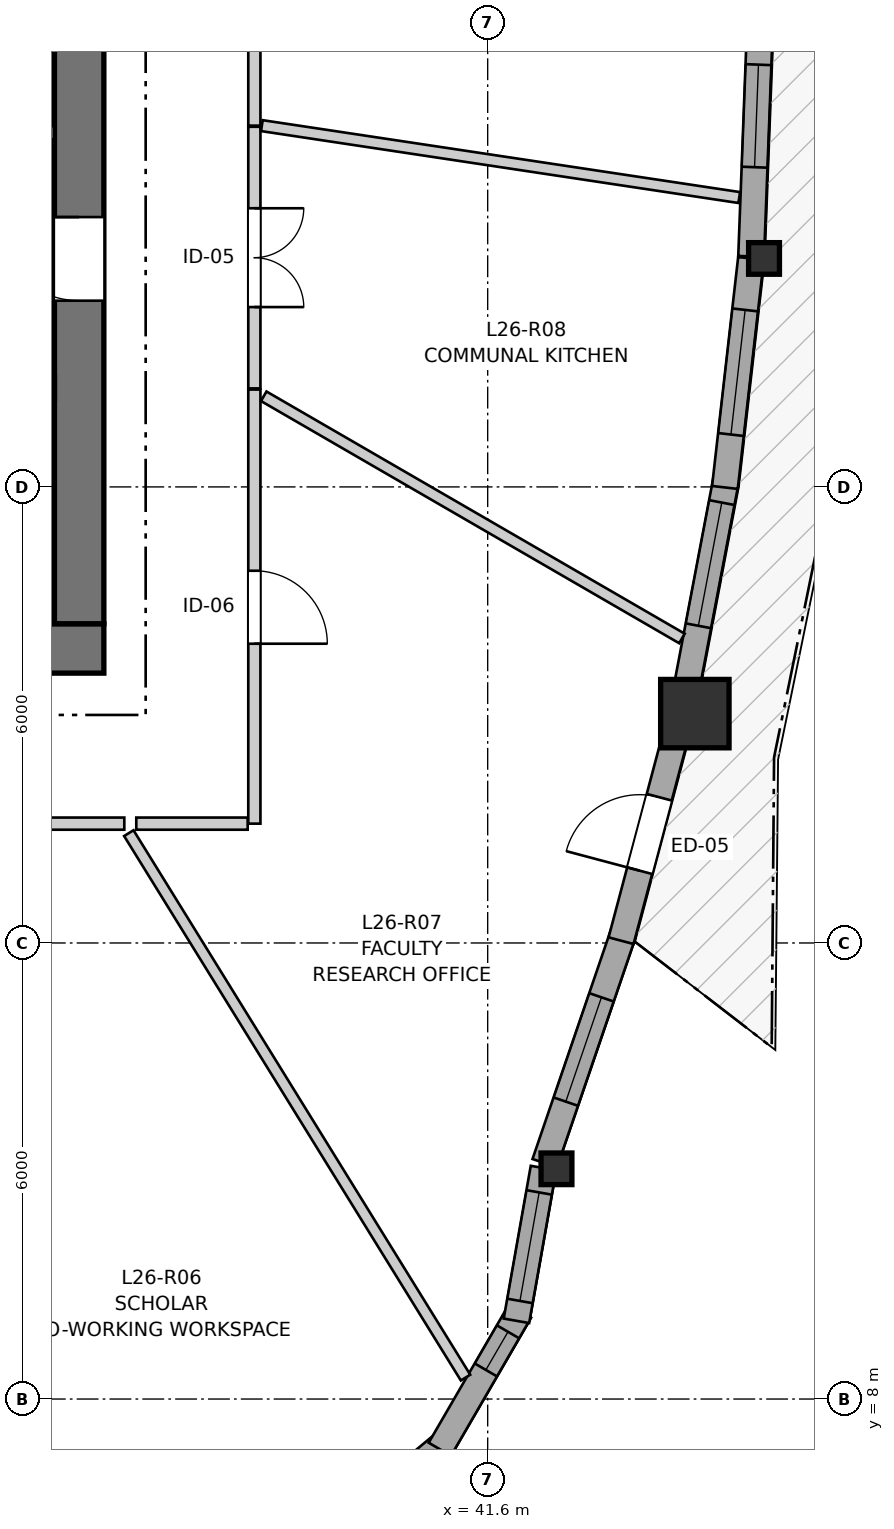
"""IFC4 building model, lengths in metres.
Left out: names, types, materials, properties, quantities, classifications, styles, units other than length and angle.
Written with IfcOpenShell. Run it as: python <this file> out.ifc"""

import sys

from ifc_helpers import new_model, si_unit, direction, frame, frame_2d, origin, origin_2d, place, context, subcontext, project, spatial, rectangle, i_section, extrude, source, transform, mapped, element, fill, save


model = new_model("IFC4")
c1 = context("Model", 3, precision=1e-05, world=origin(), true_north=direction((0.0, 1.0)))
c2 = subcontext(c1, "Body", "Model", "MODEL_VIEW")
j1 = project(units=[si_unit("LENGTHUNIT", "METRE"), si_unit("PLANEANGLEUNIT", "RADIAN")], contexts=[c1])
p1 = place(None, origin())
s1 = spatial("IfcSite", under=j1, at=p1, CompositionType="ELEMENT")
p2 = place(p1, origin())
s2 = spatial("IfcBuilding", under=s1, at=p2, CompositionType="ELEMENT")
p3 = place(p2, frame((0.0, 0.0, 89.6)))
s3 = spatial("IfcBuildingStorey", under=s2, at=p3, CompositionType="ELEMENT", Elevation=89.6)
p4 = place(p3, frame((24.15, 17.875, 0.0), z_axis=(0.0, 0.0, 1.0), x_axis=(1.0, 0.0, 0.0)))
e1 = element("IfcWall", 1, at=p4, inside=s3, PredefinedType="SHEAR", context=c2, shape_type="SweptSolid", body=[
    extrude(rectangle(XDim=12.4, YDim=0.65, at=frame_2d((6.2, 0.0))), origin(), (0.0, 0.0, 1.0), 2.95),
])
p5 = place(p3, frame((36.225, 18.2, 0.0), z_axis=(0.0, 0.0, 1.0), x_axis=(0.0, 1.0, 0.0)))
e2 = element("IfcWall", 2, at=p5, inside=s3, PredefinedType="SHEAR", context=c2, shape_type="SweptSolid", body=[
    extrude(rectangle(XDim=15.6, YDim=0.65, at=frame_2d((7.8, 0.0))), origin(), (0.0, 0.0, 1.0), 2.95),
])
p6 = place(p5, frame((4.25, 0.0, 0.0)))
e3 = element("IfcOpeningElement", 3, at=p6, cuts=e2, PredefinedType="OPENING", context=c2, shape_type="SweptSolid", body=[
    extrude(rectangle(XDim=1.1, YDim=2.15, at=frame_2d((0.55, 1.075))), frame((0.0, 0.335, 0.0), z_axis=(0.0, -1.0, 0.0), x_axis=(1.0, 0.0, 0.0)), (0.0, 0.0, 1.0), 0.67),
])
p7 = place(p5, frame((10.25, 0.0, 0.0)))
e4 = element("IfcOpeningElement", 4, at=p7, cuts=e2, PredefinedType="OPENING", context=c2, shape_type="SweptSolid", body=[
    extrude(rectangle(XDim=1.1, YDim=2.15, at=frame_2d((0.55, 1.075))), frame((0.0, 0.335, 0.0), z_axis=(0.0, -1.0, 0.0), x_axis=(1.0, 0.0, 0.0)), (0.0, 0.0, 1.0), 0.67),
])
p8 = place(p3, frame((24.8, 21.3, 0.0), z_axis=(0.0, 0.0, 1.0), x_axis=(1.0, 0.0, 0.0)))
e5 = element("IfcWall", 5, at=p8, inside=s3, PredefinedType="SHEAR", context=c2, shape_type="SweptSolid", body=[
    extrude(rectangle(XDim=11.1, YDim=0.3, at=frame_2d((5.55, 0.0))), origin(), (0.0, 0.0, 1.0), 2.95),
])
p9 = place(p8, frame((6.22, 0.0, 0.0)))
e6 = element("IfcOpeningElement", 6, at=p9, cuts=e5, PredefinedType="OPENING", context=c2, shape_type="SweptSolid", body=[
    extrude(rectangle(XDim=0.98, YDim=2.15, at=frame_2d((0.49, 1.075))), frame((0.0, 0.16, 0.0), z_axis=(0.0, -1.0, 0.0), x_axis=(1.0, 0.0, 0.0)), (0.0, 0.0, 1.0), 0.32),
])
p10 = place(p8, frame((9.15, 0.0, 0.0)))
e7 = element("IfcOpeningElement", 7, at=p10, cuts=e5, PredefinedType="OPENING", context=c2, shape_type="SweptSolid", body=[
    extrude(rectangle(XDim=1.15, YDim=2.15, at=frame_2d((0.575, 1.075))), frame((0.0, 0.16, 0.0), z_axis=(0.0, -1.0, 0.0), x_axis=(1.0, 0.0, 0.0)), (0.0, 0.0, 1.0), 0.32),
])
m1 = source(origin(), c2, "Body", "SweptSolid", [
    extrude(i_section(OverallWidth=0.406, OverallDepth=0.416, WebThickness=0.027, FlangeThickness=0.044, FilletRadius=0.015, at=origin_2d()), origin(), (0.0, 0.0, 1.0), 2.95),
])
p11 = place(p3, frame((42.505, 11.029, 0.0), z_axis=(0.0, 0.0, 1.0), x_axis=(1.0, 0.0, 0.0)))
e8 = element("IfcColumn", 8, at=p11, inside=s3, PredefinedType="PILASTER", context=c2, shape_type="MappedRepresentation", body=[
    mapped(m1, transform((0.0, 0.0, 0.0), x_axis=(1.0, 0.0, 0.0), y_axis=(0.0, 1.0, 0.0), z_axis=(0.0, 0.0, 1.0), scale=1.0)),
])
m2 = source(origin(), c2, "Body", "SweptSolid", [
    extrude(rectangle(XDim=0.9, YDim=0.9, at=origin_2d()), origin(), (0.0, 0.0, 1.0), 2.95),
])
p12 = place(p3, frame((44.325, 17.017, 0.0), z_axis=(0.0, 0.0, 1.0), x_axis=(1.0, 0.0, 0.0)))
e9 = element("IfcColumn", 9, at=p12, inside=s3, PredefinedType="COLUMN", context=c2, shape_type="MappedRepresentation", body=[
    mapped(m2, transform((0.0, 0.0, 0.0), x_axis=(1.0, 0.0, 0.0), y_axis=(0.0, 1.0, 0.0), z_axis=(0.0, 0.0, 1.0), scale=1.0)),
])
p13 = place(p3, frame((45.236, 23.006, 0.0), z_axis=(0.0, 0.0, 1.0), x_axis=(1.0, 0.0, 0.0)))
e10 = element("IfcColumn", 10, at=p13, inside=s3, PredefinedType="PILASTER", context=c2, shape_type="MappedRepresentation", body=[
    mapped(m1, transform((0.0, 0.0, 0.0), x_axis=(1.0, 0.0, 0.0), y_axis=(0.0, 1.0, 0.0), z_axis=(0.0, 0.0, 1.0), scale=1.0)),
])
p14 = place(p3, frame((39.444, 6.099, 0.0), z_axis=(0.0, 0.0, 1.0), x_axis=(0.768497696041, 0.639852554249, 0.0)))
e11 = element("IfcWall", 11, at=p14, inside=s3, PredefinedType="SOLIDWALL", context=c2, shape_type="SweptSolid", body=[
    extrude(rectangle(XDim=2.099, YDim=0.34, at=frame_2d((1.049, 0.0))), origin(), (0.0, 0.0, 1.0), 2.48),
])
p15 = place(p14, frame((0.574, 0.0, 0.82)))
e12 = element("IfcOpeningElement", 12, at=p15, cuts=e11, PredefinedType="OPENING", context=c2, shape_type="SweptSolid", body=[
    extrude(rectangle(XDim=0.95, YDim=1.35, at=frame_2d((0.475, 0.675))), frame((0.0, 0.18, 0.0), z_axis=(0.0, -1.0, 0.0), x_axis=(1.0, 0.0, 0.0)), (0.0, 0.0, 1.0), 0.36),
])
p16 = place(p3, frame((40.971, 7.34, 0.0), z_axis=(0.0, 0.0, 1.0), x_axis=(0.501902596059, 0.864924149315, 0.0)))
e13 = element("IfcWall", 13, at=p16, inside=s3, PredefinedType="SOLIDWALL", context=c2, shape_type="SweptSolid", body=[
    extrude(rectangle(XDim=2.099, YDim=0.34, at=frame_2d((1.049, 0.0))), origin(), (0.0, 0.0, 1.0), 2.48),
])
p17 = place(p16, frame((1.206, 0.0, 0.82)))
e14 = element("IfcOpeningElement", 14, at=p17, cuts=e13, PredefinedType="OPENING", context=c2, shape_type="SweptSolid", body=[
    extrude(rectangle(XDim=0.58, YDim=1.35, at=frame_2d((0.29, 0.675))), frame((0.0, 0.18, 0.0), z_axis=(0.0, -1.0, 0.0), x_axis=(1.0, 0.0, 0.0)), (0.0, 0.0, 1.0), 0.36),
])
p18 = place(p3, frame((41.978, 9.029, 0.0), z_axis=(0.0, 0.0, 1.0), x_axis=(0.174283452483, 0.984695525627, 0.0)))
e15 = element("IfcWall", 15, at=p18, inside=s3, PredefinedType="SOLIDWALL", context=c2, shape_type="SweptSolid", body=[
    extrude(rectangle(XDim=2.041, YDim=0.34, at=frame_2d((1.021, 0.0))), origin(), (0.0, 0.0, 1.0), 2.48),
])
p19 = place(p18, frame((0.265, 0.0, 0.82)))
e16 = element("IfcOpeningElement", 16, at=p19, cuts=e15, PredefinedType="OPENING", context=c2, shape_type="SweptSolid", body=[
    extrude(rectangle(XDim=1.45, YDim=1.25, at=frame_2d((0.725, 0.625))), frame((0.0, 0.18, 0.0), z_axis=(0.0, -1.0, 0.0), x_axis=(1.0, 0.0, 0.0)), (0.0, 0.0, 1.0), 0.36),
])
p20 = place(p3, frame((42.351, 11.103, 0.0), z_axis=(0.0, 0.0, 1.0), x_axis=(0.323582854182, 0.946199839611, 0.0)))
e17 = element("IfcWall", 17, at=p20, inside=s3, PredefinedType="SOLIDWALL", context=c2, shape_type="SweptSolid", body=[
    extrude(rectangle(XDim=3.182, YDim=0.34, at=frame_2d((1.591, 0.0))), origin(), (0.0, 0.0, 1.0), 2.48),
])
p21 = place(p20, frame((0.856, 0.0, 0.82)))
e18 = element("IfcOpeningElement", 18, at=p21, cuts=e17, PredefinedType="OPENING", context=c2, shape_type="SweptSolid", body=[
    extrude(rectangle(XDim=1.45, YDim=1.25, at=frame_2d((0.725, 0.625))), frame((0.0, 0.18, 0.0), z_axis=(0.0, -1.0, 0.0), x_axis=(1.0, 0.0, 0.0)), (0.0, 0.0, 1.0), 0.36),
])
p22 = place(p3, frame((43.355, 14.03, 0.0), z_axis=(0.0, 0.0, 1.0), x_axis=(0.257056088809, 0.96639648551, 0.0)))
e19 = element("IfcWall", 19, at=p22, inside=s3, PredefinedType="SOLIDWALL", context=c2, shape_type="SweptSolid", body=[
    extrude(rectangle(XDim=2.906, YDim=0.34, at=frame_2d((1.453, 0.0))), origin(), (0.0, 0.0, 1.0), 2.48),
])
p23 = place(p22, frame((0.953, 0.0, 0.0)))
e20 = element("IfcOpeningElement", 20, at=p23, cuts=e19, PredefinedType="OPENING", context=c2, shape_type="SweptSolid", body=[
    extrude(rectangle(XDim=1.0, YDim=2.1, at=frame_2d((0.5, 1.05))), frame((0.0, 0.18, 0.0), z_axis=(0.0, -1.0, 0.0), x_axis=(1.0, 0.0, 0.0)), (0.0, 0.0, 1.0), 0.36),
])
p24 = place(p3, frame((44.201, 17.275, 0.0), z_axis=(0.0, 0.0, 1.0), x_axis=(0.186703550023, 0.982416298933, 0.0)))
e21 = element("IfcWall", 21, at=p24, inside=s3, PredefinedType="SOLIDWALL", context=c2, shape_type="SweptSolid", body=[
    extrude(rectangle(XDim=2.856, YDim=0.34, at=frame_2d((1.428, 0.0))), origin(), (0.0, 0.0, 1.0), 2.48),
])
p25 = place(p24, frame((0.914, 0.0, 0.82)))
e22 = element("IfcOpeningElement", 22, at=p25, cuts=e21, PredefinedType="OPENING", context=c2, shape_type="SweptSolid", body=[
    extrude(rectangle(XDim=1.65, YDim=1.45, at=frame_2d((0.825, 0.725))), frame((0.0, 0.18, 0.0), z_axis=(0.0, -1.0, 0.0), x_axis=(1.0, 0.0, 0.0)), (0.0, 0.0, 1.0), 0.36),
])
p26 = place(p3, frame((44.721, 19.993, 0.0), z_axis=(0.0, 0.0, 1.0), x_axis=(0.113224078967, 0.993569478165, 0.0)))
e23 = element("IfcWall", 23, at=p26, inside=s3, PredefinedType="SOLIDWALL", context=c2, shape_type="SweptSolid", body=[
    extrude(rectangle(XDim=3.032, YDim=0.34, at=frame_2d((1.516, 0.0))), origin(), (0.0, 0.0, 1.0), 2.48),
])
p27 = place(p26, frame((0.701, 0.0, 0.82)))
e24 = element("IfcOpeningElement", 24, at=p27, cuts=e23, PredefinedType="OPENING", context=c2, shape_type="SweptSolid", body=[
    extrude(rectangle(XDim=1.65, YDim=1.45, at=frame_2d((0.825, 0.725))), frame((0.0, 0.18, 0.0), z_axis=(0.0, -1.0, 0.0), x_axis=(1.0, 0.0, 0.0)), (0.0, 0.0, 1.0), 0.36),
])
p28 = place(p3, frame((45.067, 23.032, 0.0), z_axis=(0.0, 0.0, 1.0), x_axis=(0.037985210196, 0.999278301479, 0.0)))
e25 = element("IfcWall", 25, at=p28, inside=s3, PredefinedType="SOLIDWALL", context=c2, shape_type="SweptSolid", body=[
    extrude(rectangle(XDim=3.014, YDim=0.34, at=frame_2d((1.507, 0.0))), origin(), (0.0, 0.0, 1.0), 2.48),
])
p29 = place(p28, frame((1.175, 0.0, 0.82)))
e26 = element("IfcOpeningElement", 26, at=p29, cuts=e25, PredefinedType="OPENING", context=c2, shape_type="SweptSolid", body=[
    extrude(rectangle(XDim=1.35, YDim=1.45, at=frame_2d((0.675, 0.725))), frame((0.0, 0.18, 0.0), z_axis=(0.0, -1.0, 0.0), x_axis=(1.0, 0.0, 0.0)), (0.0, 0.0, 1.0), 0.36),
])
p30 = place(p3, frame((30.67, 24.66, 0.0), z_axis=(0.0, 0.0, 1.0), x_axis=(1.0, 0.0, 0.0)))
e27 = element("IfcWall", 27, at=p30, inside=s3, PredefinedType="PARTITIONING", context=c2, shape_type="SweptSolid", body=[
    extrude(rectangle(XDim=5.22, YDim=0.18, at=frame_2d((2.61, 0.0))), origin(), (0.0, 0.0, 1.0), 2.95),
])
p31 = place(p30, frame((0.68, 0.0, 0.0)))
e28 = element("IfcOpeningElement", 28, at=p31, cuts=e27, PredefinedType="OPENING", context=c2, shape_type="SweptSolid", body=[
    extrude(rectangle(XDim=0.98, YDim=2.15, at=frame_2d((0.49, 1.075))), frame((0.0, 0.1, 0.0), z_axis=(0.0, -1.0, 0.0), x_axis=(1.0, 0.0, 0.0)), (0.0, 0.0, 1.0), 0.2),
])
p32 = place(p3, frame((38.53, 21.281, 0.0), z_axis=(0.0, 0.0, 1.0), x_axis=(0.0, -1.0, 0.0)))
e29 = element("IfcWall", 29, at=p32, inside=s3, PredefinedType="PARTITIONING", context=c2, shape_type="SweptSolid", body=[
    extrude(rectangle(XDim=5.711, YDim=0.16, at=frame_2d((2.855, 0.0))), origin(), (0.0, 0.0, 1.0), 2.95),
])
p33 = place(p32, frame((2.384, 0.0, 0.0)))
e30 = element("IfcOpeningElement", 30, at=p33, cuts=e29, PredefinedType="OPENING", context=c2, shape_type="SweptSolid", body=[
    extrude(rectangle(XDim=0.96, YDim=2.1, at=frame_2d((0.48, 1.05))), frame((0.0, 0.09, 0.0), z_axis=(0.0, -1.0, 0.0), x_axis=(1.0, 0.0, 0.0)), (0.0, 0.0, 1.0), 0.18),
])
p34 = place(p3, frame((38.53, 29.22, 0.0), z_axis=(0.0, 0.0, 1.0), x_axis=(0.0, -1.0, 0.0)))
e31 = element("IfcWall", 31, at=p34, inside=s3, PredefinedType="PARTITIONING", context=c2, shape_type="SweptSolid", body=[
    extrude(rectangle(XDim=4.467, YDim=0.16, at=frame_2d((2.233, 0.0))), origin(), (0.0, 0.0, 1.0), 2.95),
])
p35 = place(p34, frame((1.584, 0.0, 0.0)))
e32 = element("IfcOpeningElement", 32, at=p35, cuts=e31, PredefinedType="OPENING", context=c2, shape_type="SweptSolid", body=[
    extrude(rectangle(XDim=1.3, YDim=2.1, at=frame_2d((0.65, 1.05))), frame((0.0, 0.09, 0.0), z_axis=(0.0, -1.0, 0.0), x_axis=(1.0, 0.0, 0.0)), (0.0, 0.0, 1.0), 0.18),
])
p36 = place(p3, frame((36.819, 15.57, 0.0), z_axis=(0.0, 0.0, 1.0), x_axis=(-1.0, 0.0, 0.0)))
e33 = element("IfcWall", 33, at=p36, inside=s3, PredefinedType="PARTITIONING", context=c2, shape_type="SweptSolid", body=[
    extrude(rectangle(XDim=3.956, YDim=0.16, at=frame_2d((1.978, 0.0))), origin(), (0.0, 0.0, 1.0), 2.95),
])
p37 = place(p36, frame((1.522, 0.0, 0.0)))
e34 = element("IfcOpeningElement", 34, at=p37, cuts=e33, PredefinedType="OPENING", context=c2, shape_type="SweptSolid", body=[
    extrude(rectangle(XDim=0.96, YDim=2.1, at=frame_2d((0.48, 1.05))), frame((0.0, 0.09, 0.0), z_axis=(0.0, -1.0, 0.0), x_axis=(1.0, 0.0, 0.0)), (0.0, 0.0, 1.0), 0.18),
])
p38 = place(p3, frame((38.53, 24.738, 0.0), z_axis=(0.0, 0.0, 1.0), x_axis=(0.0, -1.0, 0.0)))
e35 = element("IfcWall", 35, at=p38, inside=s3, PredefinedType="PARTITIONING", context=c2, shape_type="SweptSolid", body=[
    extrude(rectangle(XDim=3.442, YDim=0.16, at=frame_2d((1.721, 0.0))), origin(), (0.0, 0.0, 1.0), 2.95),
])
p39 = place(p38, frame((1.072, 0.0, 0.0)))
e36 = element("IfcOpeningElement", 36, at=p39, cuts=e35, PredefinedType="OPENING", context=c2, shape_type="SweptSolid", body=[
    extrude(rectangle(XDim=1.3, YDim=2.1, at=frame_2d((0.65, 1.05))), frame((0.0, 0.09, 0.0), z_axis=(0.0, -1.0, 0.0), x_axis=(1.0, 0.0, 0.0)), (0.0, 0.0, 1.0), 0.18),
])
p40 = place(p3, frame((36.878, 15.445, 0.0), z_axis=(0.0, 0.0, 1.0), x_axis=(0.526001305793, -0.850483760165, 0.0)))
e37 = element("IfcWall", 37, at=p40, inside=s3, PredefinedType="PARTITIONING", context=c2, shape_type="SweptSolid", body=[
    extrude(rectangle(XDim=8.422, YDim=0.145, at=frame_2d((4.211, 0.0))), origin(), (0.0, 0.0, 1.0), 2.95),
])
p41 = place(p3, frame((38.653, 21.193, 0.0), z_axis=(0.0, 0.0, 1.0), x_axis=(0.865364941279, -0.501142213753, 0.0)))
e38 = element("IfcWall", 38, at=p41, inside=s3, PredefinedType="PARTITIONING", context=c2, shape_type="SweptSolid", body=[
    extrude(rectangle(XDim=6.359, YDim=0.145, at=frame_2d((3.179, 0.0))), origin(), (0.0, 0.0, 1.0), 2.95),
])
p42 = place(p3, frame((38.629, 24.753, 0.0), z_axis=(0.0, 0.0, 1.0), x_axis=(0.988841427723, -0.148971912852, 0.0)))
e39 = element("IfcWall", 39, at=p42, inside=s3, PredefinedType="PARTITIONING", context=c2, shape_type="SweptSolid", body=[
    extrude(rectangle(XDim=6.352, YDim=0.145, at=frame_2d((3.176, 0.0))), origin(), (0.0, 0.0, 1.0), 2.95),
])
p43 = place(p3, frame((36.977, 15.57, 0.0), z_axis=(0.0, 0.0, 1.0), x_axis=(1.0, 0.0, 0.0)))
e40 = element("IfcWall", 40, at=p43, inside=s3, PredefinedType="PARTITIONING", context=c2, shape_type="SweptSolid", body=[
    extrude(rectangle(XDim=1.465, YDim=0.16, at=frame_2d((0.732, 0.0))), origin(), (0.0, 0.0, 1.0), 2.95),
])
m3 = source(origin(), c2, "Body", "SweptSolid", [
    extrude(rectangle(XDim=0.58, YDim=1.35, at=frame_2d((0.29, 0.675))), frame((0.0, 0.03, 0.0), z_axis=(0.0, -1.0, 0.0), x_axis=(1.0, 0.0, 0.0)), (0.0, 0.0, 1.0), 0.06),
])
p44 = place(p17, origin())
e41 = element("IfcWindow", 41, at=p44, inside=s3, PartitioningType="SINGLE_PANEL", PredefinedType="WINDOW", context=c2, shape_type="MappedRepresentation", body=[
    mapped(m3, transform((0.0, 0.0, 0.0), x_axis=(1.0, 0.0, 0.0), y_axis=(0.0, 1.0, 0.0), z_axis=(0.0, 0.0, 1.0), scale=1.0)),
])
fill(e14, e41)
m4 = source(origin(), c2, "Body", "SweptSolid", [
    extrude(rectangle(XDim=1.45, YDim=1.25, at=frame_2d((0.725, 0.625))), frame((0.0, 0.03, 0.0), z_axis=(0.0, -1.0, 0.0), x_axis=(1.0, 0.0, 0.0)), (0.0, 0.0, 1.0), 0.06),
])
p45 = place(p19, origin())
e42 = element("IfcWindow", 42, at=p45, inside=s3, PartitioningType="SINGLE_PANEL", PredefinedType="WINDOW", context=c2, shape_type="MappedRepresentation", body=[
    mapped(m4, transform((0.0, 0.0, 0.0), x_axis=(1.0, 0.0, 0.0), y_axis=(0.0, 1.0, 0.0), z_axis=(0.0, 0.0, 1.0), scale=1.0)),
])
fill(e16, e42)
p46 = place(p21, origin())
e43 = element("IfcWindow", 43, at=p46, inside=s3, PartitioningType="SINGLE_PANEL", PredefinedType="WINDOW", context=c2, shape_type="MappedRepresentation", body=[
    mapped(m4, transform((0.0, 0.0, 0.0), x_axis=(1.0, 0.0, 0.0), y_axis=(0.0, 1.0, 0.0), z_axis=(0.0, 0.0, 1.0), scale=1.0)),
])
fill(e18, e43)
m5 = source(origin(), c2, "Body", "SweptSolid", [
    extrude(rectangle(XDim=1.65, YDim=1.45, at=frame_2d((0.825, 0.725))), frame((0.0, 0.03, 0.0), z_axis=(0.0, -1.0, 0.0), x_axis=(1.0, 0.0, 0.0)), (0.0, 0.0, 1.0), 0.06),
])
p47 = place(p25, origin())
e44 = element("IfcWindow", 44, at=p47, inside=s3, PartitioningType="SINGLE_PANEL", PredefinedType="WINDOW", context=c2, shape_type="MappedRepresentation", body=[
    mapped(m5, transform((0.0, 0.0, 0.0), x_axis=(1.0, 0.0, 0.0), y_axis=(0.0, 1.0, 0.0), z_axis=(0.0, 0.0, 1.0), scale=1.0)),
])
fill(e22, e44)
p48 = place(p27, origin())
e45 = element("IfcWindow", 45, at=p48, inside=s3, PartitioningType="SINGLE_PANEL", PredefinedType="WINDOW", context=c2, shape_type="MappedRepresentation", body=[
    mapped(m5, transform((0.0, 0.0, 0.0), x_axis=(1.0, 0.0, 0.0), y_axis=(0.0, 1.0, 0.0), z_axis=(0.0, 0.0, 1.0), scale=1.0)),
])
fill(e24, e45)
m6 = source(origin(), c2, "Body", "SweptSolid", [
    extrude(rectangle(XDim=1.35, YDim=1.45, at=frame_2d((0.675, 0.725))), frame((0.0, 0.03, 0.0), z_axis=(0.0, -1.0, 0.0), x_axis=(1.0, 0.0, 0.0)), (0.0, 0.0, 1.0), 0.06),
])
p49 = place(p29, origin())
e46 = element("IfcWindow", 46, at=p49, inside=s3, PartitioningType="SINGLE_PANEL", PredefinedType="WINDOW", context=c2, shape_type="MappedRepresentation", body=[
    mapped(m6, transform((0.0, 0.0, 0.0), x_axis=(1.0, 0.0, 0.0), y_axis=(0.0, 1.0, 0.0), z_axis=(0.0, 0.0, 1.0), scale=1.0)),
])
fill(e26, e46)
m7 = source(origin(), c2, "Body", "SweptSolid", [
    extrude(rectangle(XDim=1.0, YDim=2.1, at=frame_2d((0.5, 1.05))), frame((0.0, 0.025, 0.0), z_axis=(0.0, -1.0, 0.0), x_axis=(1.0, 0.0, 0.0)), (0.0, 0.0, 1.0), 0.05),
])
p50 = place(p23, origin())
e47 = element("IfcDoor", 47, at=p50, inside=s3, OperationType="SINGLE_SWING_LEFT", PredefinedType="DOOR", context=c2, shape_type="MappedRepresentation", body=[
    mapped(m7, transform((0.0, 0.0, 0.0), x_axis=(1.0, 0.0, 0.0), y_axis=(0.0, 1.0, 0.0), z_axis=(0.0, 0.0, 1.0), scale=1.0)),
])
fill(e20, e47)
m8 = source(origin(), c2, "Body", "SweptSolid", [
    extrude(rectangle(XDim=1.1, YDim=2.15, at=frame_2d((0.55, 1.075))), frame((0.0, 0.025, 0.0), z_axis=(0.0, -1.0, 0.0), x_axis=(1.0, 0.0, 0.0)), (0.0, 0.0, 1.0), 0.05),
])
p51 = place(p6, origin())
e48 = element("IfcDoor", 48, at=p51, inside=s3, OperationType="SINGLE_SWING_RIGHT", PredefinedType="DOOR", context=c2, shape_type="MappedRepresentation", body=[
    mapped(m8, transform((0.0, 0.0, 0.0), x_axis=(1.0, 0.0, 0.0), y_axis=(0.0, 1.0, 0.0), z_axis=(0.0, 0.0, 1.0), scale=1.0)),
])
fill(e3, e48)
m9 = source(origin(), c2, "Body", "SweptSolid", [
    extrude(rectangle(XDim=0.96, YDim=2.1, at=frame_2d((0.48, 1.05))), frame((0.0, 0.025, 0.0), z_axis=(0.0, -1.0, 0.0), x_axis=(1.0, 0.0, 0.0)), (0.0, 0.0, 1.0), 0.05),
])
p52 = place(p33, origin())
e49 = element("IfcDoor", 49, at=p52, inside=s3, OperationType="SINGLE_SWING_RIGHT", PredefinedType="DOOR", context=c2, shape_type="MappedRepresentation", body=[
    mapped(m9, transform((0.0, 0.0, 0.0), x_axis=(1.0, 0.0, 0.0), y_axis=(0.0, 1.0, 0.0), z_axis=(0.0, 0.0, 1.0), scale=1.0)),
])
fill(e30, e49)
m10 = source(origin(), c2, "Body", "SweptSolid", [
    extrude(rectangle(XDim=1.3, YDim=2.1, at=frame_2d((0.65, 1.05))), frame((0.0, 0.025, 0.0), z_axis=(0.0, -1.0, 0.0), x_axis=(1.0, 0.0, 0.0)), (0.0, 0.0, 1.0), 0.05),
])
p53 = place(p39, origin())
e50 = element("IfcDoor", 50, at=p53, inside=s3, OperationType="DOUBLE_DOOR_SINGLE_SWING", PredefinedType="DOOR", context=c2, shape_type="MappedRepresentation", body=[
    mapped(m10, transform((0.0, 0.0, 0.0), x_axis=(1.0, 0.0, 0.0), y_axis=(0.0, 1.0, 0.0), z_axis=(0.0, 0.0, 1.0), scale=1.0)),
])
fill(e36, e50)
save(model, sys.argv[1])
